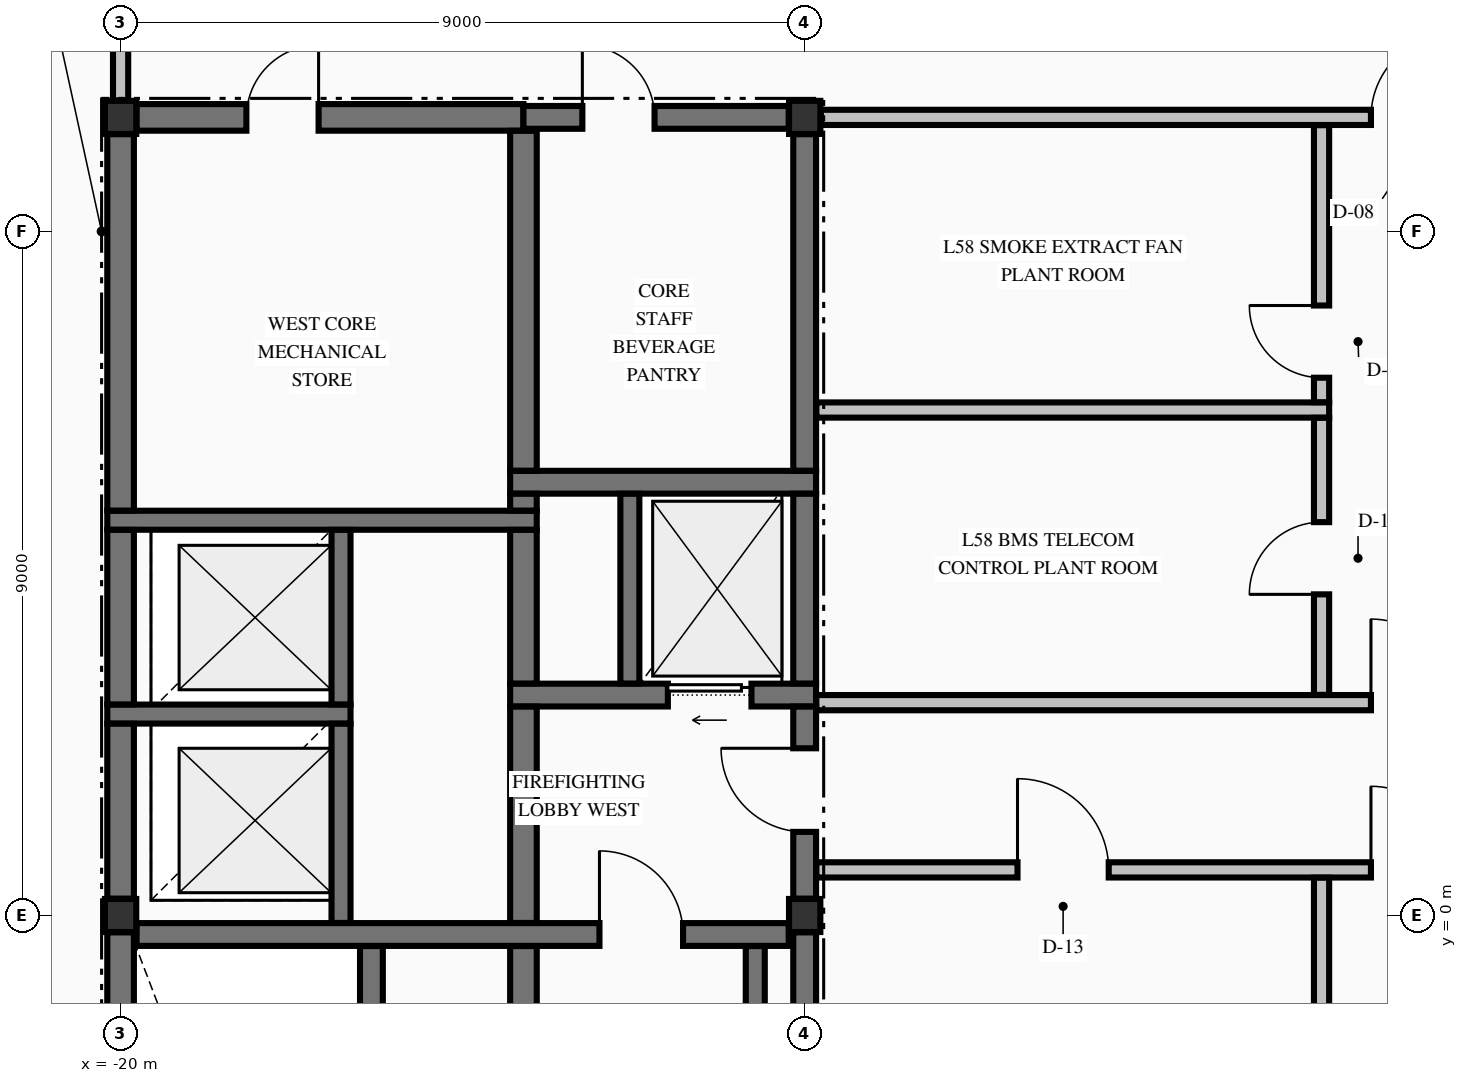
"""IFC4 building model, lengths in metres.
Left out: names, types, materials, properties, quantities, classifications, styles, units other than length and angle.
Written with IfcOpenShell. Run it as: python <this file> out.ifc"""

import sys

from ifc_helpers import new_model, si_unit, direction, frame, frame_2d, origin, origin_2d, place, context, subcontext, project, spatial, rectangle, i_section, extrude, element, fill, save


model = new_model("IFC4")
c1 = context("Model", 3, precision=1e-05, world=origin(), true_north=direction((0.0, 1.0)))
c2 = subcontext(c1, "Body", "Model", "MODEL_VIEW")
j1 = project(units=[si_unit("LENGTHUNIT", "METRE"), si_unit("PLANEANGLEUNIT", "RADIAN")], contexts=[c1])
p1 = place(None, origin())
s1 = spatial("IfcSite", under=j1, at=p1, CompositionType="ELEMENT")
p2 = place(p1, origin())
s2 = spatial("IfcBuilding", under=s1, at=p2, CompositionType="ELEMENT")
p3 = place(p2, frame((0.0, 0.0, 222.06)))
s3 = spatial("IfcBuildingStorey", under=s2, at=p3, CompositionType="ELEMENT", Elevation=222.06)
for number, where, z_axis, x_axis in (
    (1, (-20.0, 10.5, -0.425), (0.0, 0.0, 1.0), (1.0, 0.0, 0.0)),
    (2, (-11.0, 0.0, -0.425), (0.0, 0.0, 1.0), (1.0, 0.0, 0.0)),
    (3, (-11.0, 10.5, -0.425), (0.0, 0.0, 1.0), (1.0, 0.0, 0.0)),
    (4, (-20.0, 0.0, -0.425), (0.0, 0.0, 1.0), (1.0, 0.0, 0.0)),
):
    element("IfcColumn", number, at=place(p3, frame(where, z_axis=z_axis, x_axis=x_axis)), inside=s3, PredefinedType="COLUMN", context=c2, shape_type="SweptSolid", body=[
        extrude(i_section(OverallWidth=0.412, OverallDepth=0.435, WebThickness=0.036, FlangeThickness=0.058, FilletRadius=0.015, at=origin_2d()), origin(), (0.0, 0.0, 1.0), 4.76),
    ])
p4 = place(p3, frame((-19.79, -0.25, 0.0), z_axis=(0.0, 0.0, 1.0), x_axis=(1.0, 0.0, 0.0)))
e5 = element("IfcWall", 5, at=p4, inside=s3, PredefinedType="SHEAR", context=c2, shape_type="SweptSolid", body=[
    extrude(rectangle(XDim=8.58, YDim=0.3, at=frame_2d((4.29, 0.0))), origin(), (0.0, 0.0, 1.0), 4.335),
])
p5 = place(p4, frame((6.09, 0.0, 0.0)))
e6 = element("IfcOpeningElement", 6, at=p5, cuts=e5, PredefinedType="OPENING", context=c2, shape_type="SweptSolid", body=[
    extrude(rectangle(XDim=1.1, YDim=2.15, at=frame_2d((0.55, 1.075))), frame((0.0, 0.16, 0.0), z_axis=(0.0, -1.0, 0.0), x_axis=(1.0, 0.0, 0.0)), (0.0, 0.0, 1.0), 0.32),
])
p6 = place(p3, frame((-20.175, 2.65, 0.0), z_axis=(0.0, 0.0, 1.0), x_axis=(1.0, 0.0, 0.0)))
e7 = element("IfcWall", 7, at=p6, inside=s3, PredefinedType="SOLIDWALL", context=c2, shape_type="SweptSolid", body=[
    extrude(rectangle(XDim=3.2, YDim=0.25, at=frame_2d((1.6, 0.0))), origin(), (0.0, 0.0, 1.0), 4.335),
])
p7 = place(p3, frame((-14.875, 2.9, 0.0), z_axis=(0.0, 0.0, 1.0), x_axis=(1.0, 0.0, 0.0)))
e8 = element("IfcWall", 8, at=p7, inside=s3, PredefinedType="SHEAR", context=c2, shape_type="SweptSolid", body=[
    extrude(rectangle(XDim=4.025, YDim=0.3, at=frame_2d((2.012, 0.0))), origin(), (0.0, 0.0, 1.0), 4.335),
])
p8 = place(p7, frame((2.075, 0.0, 0.0)))
e9 = element("IfcOpeningElement", 9, at=p8, cuts=e8, PredefinedType="OPENING", context=c2, shape_type="SweptSolid", body=[
    extrude(rectangle(XDim=1.1, YDim=2.2, at=frame_2d((0.55, 1.1))), frame((0.0, 0.16, 0.0), z_axis=(0.0, -1.0, 0.0), x_axis=(1.0, 0.0, 0.0)), (0.0, 0.0, 1.0), 0.32),
])
p9 = place(p3, frame((-20.175, 5.2, 0.0), z_axis=(0.0, 0.0, 1.0), x_axis=(1.0, 0.0, 0.0)))
e10 = element("IfcWall", 10, at=p9, inside=s3, PredefinedType="SOLIDWALL", context=c2, shape_type="SweptSolid", body=[
    extrude(rectangle(XDim=5.65, YDim=0.25, at=frame_2d((2.825, 0.0))), origin(), (0.0, 0.0, 1.0), 4.335),
])
p10 = place(p3, frame((-14.875, 5.7, 0.0), z_axis=(0.0, 0.0, 1.0), x_axis=(1.0, 0.0, 0.0)))
e11 = element("IfcWall", 11, at=p10, inside=s3, PredefinedType="SHEAR", context=c2, shape_type="SweptSolid", body=[
    extrude(rectangle(XDim=4.025, YDim=0.3, at=frame_2d((2.012, 0.0))), origin(), (0.0, 0.0, 1.0), 4.335),
])
p11 = place(p3, frame((-19.79, 10.5, 0.0), z_axis=(0.0, 0.0, 1.0), x_axis=(1.0, 0.0, 0.0)))
e12 = element("IfcWall", 12, at=p11, inside=s3, PredefinedType="SHEAR", context=c2, shape_type="SweptSolid", body=[
    extrude(rectangle(XDim=5.09, YDim=0.35, at=frame_2d((2.545, 0.0))), origin(), (0.0, 0.0, 1.0), 4.335),
])
p12 = place(p11, frame((1.445, 0.0, 0.0)))
e13 = element("IfcOpeningElement", 13, at=p12, cuts=e12, PredefinedType="OPENING", context=c2, shape_type="SweptSolid", body=[
    extrude(rectangle(XDim=0.95, YDim=2.02, at=frame_2d((0.475, 1.01))), frame((0.0, 0.185, 0.0), z_axis=(0.0, -1.0, 0.0), x_axis=(1.0, 0.0, 0.0)), (0.0, 0.0, 1.0), 0.37),
])
p13 = place(p3, frame((-14.7, 10.5, 0.0), z_axis=(0.0, 0.0, 1.0), x_axis=(1.0, 0.0, 0.0)))
e14 = element("IfcWall", 14, at=p13, inside=s3, PredefinedType="SHEAR", context=c2, shape_type="SweptSolid", body=[
    extrude(rectangle(XDim=3.49, YDim=0.3, at=frame_2d((1.745, 0.0))), origin(), (0.0, 0.0, 1.0), 4.335),
])
p14 = place(p13, frame((0.775, 0.0, 0.0)))
e15 = element("IfcOpeningElement", 15, at=p14, cuts=e14, PredefinedType="OPENING", context=c2, shape_type="SweptSolid", body=[
    extrude(rectangle(XDim=0.95, YDim=2.02, at=frame_2d((0.475, 1.01))), frame((0.0, 0.16, 0.0), z_axis=(0.0, -1.0, 0.0), x_axis=(1.0, 0.0, 0.0)), (0.0, 0.0, 1.0), 0.32),
])
p15 = place(p3, frame((-10.847, 0.6, 0.0), z_axis=(0.0, 0.0, 1.0), x_axis=(1.0, 0.0, 0.0)))
e16 = element("IfcWall", 16, at=p15, inside=s3, PredefinedType="PARTITIONING", context=c2, shape_type="SweptSolid", body=[
    extrude(rectangle(XDim=21.694, YDim=0.2, at=frame_2d((10.847, 0.0))), origin(), (0.0, 0.0, 1.0), 4.335),
])
p16 = place(p15, frame((7.297, 0.0, 0.0)))
e17 = element("IfcOpeningElement", 17, at=p16, cuts=e16, PredefinedType="OPENING", context=c2, shape_type="SweptSolid", body=[
    extrude(rectangle(XDim=1.1, YDim=2.15, at=frame_2d((0.55, 1.075))), frame((0.0, 0.11, 0.0), z_axis=(0.0, -1.0, 0.0), x_axis=(1.0, 0.0, 0.0)), (0.0, 0.0, 1.0), 0.22),
])
p17 = place(p15, frame((2.647, 0.0, 0.0)))
e18 = element("IfcOpeningElement", 18, at=p17, cuts=e16, PredefinedType="OPENING", context=c2, shape_type="SweptSolid", body=[
    extrude(rectangle(XDim=1.2, YDim=2.15, at=frame_2d((0.6, 1.075))), frame((0.0, 0.11, 0.0), z_axis=(0.0, -1.0, 0.0), x_axis=(1.0, 0.0, 0.0)), (0.0, 0.0, 1.0), 0.22),
])
p18 = place(p15, frame((14.847, 0.0, 0.0)))
e19 = element("IfcOpeningElement", 19, at=p18, cuts=e16, PredefinedType="OPENING", context=c2, shape_type="SweptSolid", body=[
    extrude(rectangle(XDim=1.2, YDim=2.15, at=frame_2d((0.6, 1.075))), frame((0.0, 0.11, 0.0), z_axis=(0.0, -1.0, 0.0), x_axis=(1.0, 0.0, 0.0)), (0.0, 0.0, 1.0), 0.22),
])
p19 = place(p3, frame((-10.847, 2.8, 0.0), z_axis=(0.0, 0.0, 1.0), x_axis=(1.0, 0.0, 0.0)))
e20 = element("IfcWall", 20, at=p19, inside=s3, PredefinedType="PARTITIONING", context=c2, shape_type="SweptSolid", body=[
    extrude(rectangle(XDim=21.694, YDim=0.2, at=frame_2d((10.847, 0.0))), origin(), (0.0, 0.0, 1.0), 4.335),
])
p20 = place(p19, frame((7.297, 0.0, 0.0)))
e21 = element("IfcOpeningElement", 21, at=p20, cuts=e20, PredefinedType="OPENING", context=c2, shape_type="SweptSolid", body=[
    extrude(rectangle(XDim=1.1, YDim=2.15, at=frame_2d((0.55, 1.075))), frame((0.0, 0.11, 0.0), z_axis=(0.0, -1.0, 0.0), x_axis=(1.0, 0.0, 0.0)), (0.0, 0.0, 1.0), 0.22),
])
p21 = place(p19, frame((17.497, 0.0, 0.0)))
e22 = element("IfcOpeningElement", 22, at=p21, cuts=e20, PredefinedType="OPENING", context=c2, shape_type="SweptSolid", body=[
    extrude(rectangle(XDim=1.1, YDim=2.15, at=frame_2d((0.55, 1.075))), frame((0.0, 0.11, 0.0), z_axis=(0.0, -1.0, 0.0), x_axis=(1.0, 0.0, 0.0)), (0.0, 0.0, 1.0), 0.22),
])
p22 = place(p3, frame((-10.847, 6.65, 0.0), z_axis=(0.0, 0.0, 1.0), x_axis=(1.0, 0.0, 0.0)))
e23 = element("IfcWall", 23, at=p22, inside=s3, PredefinedType="PARTITIONING", context=c2, shape_type="SweptSolid", body=[
    extrude(rectangle(XDim=6.747, YDim=0.2, at=frame_2d((3.374, 0.0))), origin(), (0.0, 0.0, 1.0), 4.335),
])
p23 = place(p3, frame((-10.788, 10.5, 0.0), z_axis=(0.0, 0.0, 1.0), x_axis=(1.0, 0.0, 0.0)))
e24 = element("IfcWall", 24, at=p23, inside=s3, PredefinedType="PARTITIONING", context=c2, shape_type="SweptSolid", body=[
    extrude(rectangle(XDim=21.576, YDim=0.2, at=frame_2d((10.788, 0.0))), origin(), (0.0, 0.0, 1.0), 4.335),
])
p24 = place(p23, frame((7.238, 0.0, 0.0)))
e25 = element("IfcOpeningElement", 25, at=p24, cuts=e24, PredefinedType="OPENING", context=c2, shape_type="SweptSolid", body=[
    extrude(rectangle(XDim=1.1, YDim=2.15, at=frame_2d((0.55, 1.075))), frame((0.0, 0.11, 0.0), z_axis=(0.0, -1.0, 0.0), x_axis=(1.0, 0.0, 0.0)), (0.0, 0.0, 1.0), 0.22),
])
p25 = place(p3, frame((-20.0, -9.729, 0.0), z_axis=(0.0, 0.0, 1.0), x_axis=(0.0, 1.0, 0.0)))
e26 = element("IfcWall", 26, at=p25, inside=s3, PredefinedType="SHEAR", context=c2, shape_type="SweptSolid", body=[
    extrude(rectangle(XDim=9.507, YDim=0.35, at=frame_2d((4.753, 0.0))), origin(), (0.0, 0.0, 1.0), 4.335),
])
p26 = place(p3, frame((-20.0, 0.221, 0.0), z_axis=(0.0, 0.0, 1.0), x_axis=(0.0, 1.0, 0.0)))
e27 = element("IfcWall", 27, at=p26, inside=s3, PredefinedType="SHEAR", context=c2, shape_type="SweptSolid", body=[
    extrude(rectangle(XDim=2.302, YDim=0.35, at=frame_2d((1.151, 0.0))), origin(), (0.0, 0.0, 1.0), 4.335),
])
p27 = place(p3, frame((-20.0, 2.777, 0.0), z_axis=(0.0, 0.0, 1.0), x_axis=(0.0, 1.0, 0.0)))
e28 = element("IfcWall", 28, at=p27, inside=s3, PredefinedType="SHEAR", context=c2, shape_type="SweptSolid", body=[
    extrude(rectangle(XDim=2.296, YDim=0.35, at=frame_2d((1.148, 0.0))), origin(), (0.0, 0.0, 1.0), 4.335),
])
p28 = place(p3, frame((-20.0, 5.327, 0.0), z_axis=(0.0, 0.0, 1.0), x_axis=(0.0, 1.0, 0.0)))
e29 = element("IfcWall", 29, at=p28, inside=s3, PredefinedType="SHEAR", context=c2, shape_type="SweptSolid", body=[
    extrude(rectangle(XDim=4.952, YDim=0.35, at=frame_2d((2.476, 0.0))), origin(), (0.0, 0.0, 1.0), 4.335),
])
p29 = place(p3, frame((-17.1, -0.098, 0.0), z_axis=(0.0, 0.0, 1.0), x_axis=(0.0, 1.0, 0.0)))
e30 = element("IfcWall", 30, at=p29, inside=s3, PredefinedType="SOLIDWALL", context=c2, shape_type="SweptSolid", body=[
    extrude(rectangle(XDim=2.621, YDim=0.25, at=frame_2d((1.311, 0.0))), origin(), (0.0, 0.0, 1.0), 4.335),
])
p30 = place(p3, frame((-17.1, 2.777, 0.0), z_axis=(0.0, 0.0, 1.0), x_axis=(0.0, 1.0, 0.0)))
e31 = element("IfcWall", 31, at=p30, inside=s3, PredefinedType="SOLIDWALL", context=c2, shape_type="SweptSolid", body=[
    extrude(rectangle(XDim=2.296, YDim=0.25, at=frame_2d((1.148, 0.0))), origin(), (0.0, 0.0, 1.0), 4.335),
])
p31 = place(p3, frame((-16.7, -9.773, 0.0), z_axis=(0.0, 0.0, 1.0), x_axis=(0.0, 1.0, 0.0)))
e32 = element("IfcWall", 32, at=p31, inside=s3, PredefinedType="SHEAR", context=c2, shape_type="SweptSolid", body=[
    extrude(rectangle(XDim=9.371, YDim=0.3, at=frame_2d((4.686, 0.0))), origin(), (0.0, 0.0, 1.0), 4.335),
])
p32 = place(p3, frame((-14.7, -9.773, 0.0), z_axis=(0.0, 0.0, 1.0), x_axis=(0.0, 1.0, 0.0)))
e33 = element("IfcWall", 33, at=p32, inside=s3, PredefinedType="SHEAR", context=c2, shape_type="SweptSolid", body=[
    extrude(rectangle(XDim=9.371, YDim=0.35, at=frame_2d((4.686, 0.0))), origin(), (0.0, 0.0, 1.0), 4.335),
])
p33 = place(p3, frame((-14.7, -0.098, 0.0), z_axis=(0.0, 0.0, 1.0), x_axis=(0.0, 1.0, 0.0)))
e34 = element("IfcWall", 34, at=p33, inside=s3, PredefinedType="SHEAR", context=c2, shape_type="SweptSolid", body=[
    extrude(rectangle(XDim=2.846, YDim=0.35, at=frame_2d((1.423, 0.0))), origin(), (0.0, 0.0, 1.0), 4.335),
])
p34 = place(p3, frame((-14.7, 3.052, 0.0), z_axis=(0.0, 0.0, 1.0), x_axis=(0.0, 1.0, 0.0)))
e35 = element("IfcWall", 35, at=p34, inside=s3, PredefinedType="SHEAR", context=c2, shape_type="SweptSolid", body=[
    extrude(rectangle(XDim=2.021, YDim=0.35, at=frame_2d((1.01, 0.0))), origin(), (0.0, 0.0, 1.0), 4.335),
])
p35 = place(p3, frame((-14.7, 5.327, 0.0), z_axis=(0.0, 0.0, 1.0), x_axis=(0.0, 1.0, 0.0)))
e36 = element("IfcWall", 36, at=p35, inside=s3, PredefinedType="SHEAR", context=c2, shape_type="SweptSolid", body=[
    extrude(rectangle(XDim=0.221, YDim=0.35, at=frame_2d((0.111, 0.0))), origin(), (0.0, 0.0, 1.0), 4.335),
])
p36 = place(p3, frame((-14.7, 5.852, 0.0), z_axis=(0.0, 0.0, 1.0), x_axis=(0.0, 1.0, 0.0)))
e37 = element("IfcWall", 37, at=p36, inside=s3, PredefinedType="SHEAR", context=c2, shape_type="SweptSolid", body=[
    extrude(rectangle(XDim=4.471, YDim=0.35, at=frame_2d((2.235, 0.0))), origin(), (0.0, 0.0, 1.0), 4.335),
])
p37 = place(p3, frame((-13.3, 3.052, 0.0), z_axis=(0.0, 0.0, 1.0), x_axis=(0.0, 1.0, 0.0)))
e38 = element("IfcWall", 38, at=p37, inside=s3, PredefinedType="SOLIDWALL", context=c2, shape_type="SweptSolid", body=[
    extrude(rectangle(XDim=2.496, YDim=0.25, at=frame_2d((1.248, 0.0))), origin(), (0.0, 0.0, 1.0), 4.335),
])
p38 = place(p3, frame((-11.65, -9.798, 0.0), z_axis=(0.0, 0.0, 1.0), x_axis=(0.0, 1.0, 0.0)))
e39 = element("IfcWall", 39, at=p38, inside=s3, PredefinedType="SOLIDWALL", context=c2, shape_type="SweptSolid", body=[
    extrude(rectangle(XDim=9.396, YDim=0.25, at=frame_2d((4.698, 0.0))), origin(), (0.0, 0.0, 1.0), 4.335),
])
p39 = place(p3, frame((-11.0, -9.729, 0.0), z_axis=(0.0, 0.0, 1.0), x_axis=(0.0, 1.0, 0.0)))
e40 = element("IfcWall", 40, at=p39, inside=s3, PredefinedType="SHEAR", context=c2, shape_type="SweptSolid", body=[
    extrude(rectangle(XDim=9.507, YDim=0.3, at=frame_2d((4.753, 0.0))), origin(), (0.0, 0.0, 1.0), 4.335),
])
p40 = place(p3, frame((-11.0, 0.221, 0.0), z_axis=(0.0, 0.0, 1.0), x_axis=(0.0, 1.0, 0.0)))
e41 = element("IfcWall", 41, at=p40, inside=s3, PredefinedType="SHEAR", context=c2, shape_type="SweptSolid", body=[
    extrude(rectangle(XDim=2.527, YDim=0.3, at=frame_2d((1.263, 0.0))), origin(), (0.0, 0.0, 1.0), 4.335),
])
p41 = place(p40, frame((0.878, 0.0, 0.0)))
e42 = element("IfcOpeningElement", 42, at=p41, cuts=e41, PredefinedType="OPENING", context=c2, shape_type="SweptSolid", body=[
    extrude(rectangle(XDim=1.1, YDim=2.15, at=frame_2d((0.55, 1.075))), frame((0.0, 0.16, 0.0), z_axis=(0.0, -1.0, 0.0), x_axis=(1.0, 0.0, 0.0)), (0.0, 0.0, 1.0), 0.32),
])
p42 = place(p3, frame((-11.0, 3.052, 0.0), z_axis=(0.0, 0.0, 1.0), x_axis=(0.0, 1.0, 0.0)))
e43 = element("IfcWall", 43, at=p42, inside=s3, PredefinedType="SHEAR", context=c2, shape_type="SweptSolid", body=[
    extrude(rectangle(XDim=2.496, YDim=0.3, at=frame_2d((1.248, 0.0))), origin(), (0.0, 0.0, 1.0), 4.335),
])
p43 = place(p3, frame((-11.0, 5.852, 0.0), z_axis=(0.0, 0.0, 1.0), x_axis=(0.0, 1.0, 0.0)))
e44 = element("IfcWall", 44, at=p43, inside=s3, PredefinedType="SHEAR", context=c2, shape_type="SweptSolid", body=[
    extrude(rectangle(XDim=4.427, YDim=0.3, at=frame_2d((2.213, 0.0))), origin(), (0.0, 0.0, 1.0), 4.335),
])
p44 = place(p3, frame((-20.0, 10.723, 0.0), z_axis=(0.0, 0.0, 1.0), x_axis=(0.0, 1.0, 0.0)))
e45 = element("IfcWall", 45, at=p44, inside=s3, PredefinedType="PARTITIONING", context=c2, shape_type="SweptSolid", body=[
    extrude(rectangle(XDim=1.974, YDim=0.2, at=frame_2d((0.987, 0.0))), origin(), (0.0, 0.0, 1.0), 2.127),
])
p45 = place(p3, frame((-4.2, -9.847, 0.0), z_axis=(0.0, 0.0, 1.0), x_axis=(0.0, 1.0, 0.0)))
e46 = element("IfcWall", 46, at=p45, inside=s3, PredefinedType="PARTITIONING", context=c2, shape_type="SweptSolid", body=[
    extrude(rectangle(XDim=10.344, YDim=0.2, at=frame_2d((5.172, 0.0))), origin(), (0.0, 0.0, 1.0), 4.335),
])
p46 = place(p3, frame((-4.2, 2.903, 0.0), z_axis=(0.0, 0.0, 1.0), x_axis=(0.0, 1.0, 0.0)))
e47 = element("IfcWall", 47, at=p46, inside=s3, PredefinedType="PARTITIONING", context=c2, shape_type="SweptSolid", body=[
    extrude(rectangle(XDim=3.644, YDim=0.2, at=frame_2d((1.822, 0.0))), origin(), (0.0, 0.0, 1.0), 4.335),
])
p47 = place(p46, frame((1.322, 0.0, 0.0)))
e48 = element("IfcOpeningElement", 48, at=p47, cuts=e47, PredefinedType="OPENING", context=c2, shape_type="SweptSolid", body=[
    extrude(rectangle(XDim=0.95, YDim=2.15, at=frame_2d((0.475, 1.075))), frame((0.0, 0.11, 0.0), z_axis=(0.0, -1.0, 0.0), x_axis=(1.0, 0.0, 0.0)), (0.0, 0.0, 1.0), 0.22),
])
p48 = place(p3, frame((-4.2, 6.753, 0.0), z_axis=(0.0, 0.0, 1.0), x_axis=(0.0, 1.0, 0.0)))
e49 = element("IfcWall", 49, at=p48, inside=s3, PredefinedType="PARTITIONING", context=c2, shape_type="SweptSolid", body=[
    extrude(rectangle(XDim=3.644, YDim=0.2, at=frame_2d((1.822, 0.0))), origin(), (0.0, 0.0, 1.0), 4.335),
])
p49 = place(p48, frame((0.322, 0.0, 0.0)))
e50 = element("IfcOpeningElement", 50, at=p49, cuts=e49, PredefinedType="OPENING", context=c2, shape_type="SweptSolid", body=[
    extrude(rectangle(XDim=0.95, YDim=2.15, at=frame_2d((0.475, 1.075))), frame((0.0, 0.11, 0.0), z_axis=(0.0, -1.0, 0.0), x_axis=(1.0, 0.0, 0.0)), (0.0, 0.0, 1.0), 0.22),
])
p50 = place(p5, origin())
e51 = element("IfcDoor", 51, at=p50, inside=s3, OperationType="SINGLE_SWING_LEFT", PredefinedType="DOOR", context=c2, shape_type="SweptSolid", body=[
    extrude(rectangle(XDim=1.1, YDim=2.15, at=frame_2d((0.55, 1.075))), frame((0.0, 0.025, 0.0), z_axis=(0.0, -1.0, 0.0), x_axis=(1.0, 0.0, 0.0)), (0.0, 0.0, 1.0), 0.05),
])
fill(e6, e51)
p51 = place(p41, origin())
e52 = element("IfcDoor", 52, at=p51, inside=s3, OperationType="SINGLE_SWING_RIGHT", PredefinedType="DOOR", context=c2, shape_type="SweptSolid", body=[
    extrude(rectangle(XDim=1.1, YDim=2.15, at=frame_2d((0.55, 1.075))), frame((0.0, 0.025, 0.0), z_axis=(0.0, -1.0, 0.0), x_axis=(1.0, 0.0, 0.0)), (0.0, 0.0, 1.0), 0.05),
])
fill(e42, e52)
p52 = place(p8, origin())
e53 = element("IfcDoor", 53, at=p52, inside=s3, OperationType="SLIDING_TO_LEFT", PredefinedType="DOOR", context=c2, shape_type="SweptSolid", body=[
    extrude(rectangle(XDim=1.1, YDim=2.2, at=frame_2d((0.55, 1.1))), frame((0.0, 0.025, 0.0), z_axis=(0.0, -1.0, 0.0), x_axis=(1.0, 0.0, 0.0)), (0.0, 0.0, 1.0), 0.05),
])
fill(e9, e53)
p53 = place(p14, origin())
e54 = element("IfcDoor", 54, at=p53, inside=s3, OperationType="SINGLE_SWING_LEFT", PredefinedType="DOOR", context=c2, shape_type="SweptSolid", body=[
    extrude(rectangle(XDim=0.95, YDim=2.02, at=frame_2d((0.475, 1.01))), frame((0.0, 0.025, 0.0), z_axis=(0.0, -1.0, 0.0), x_axis=(1.0, 0.0, 0.0)), (0.0, 0.0, 1.0), 0.05),
])
fill(e15, e54)
p54 = place(p12, origin())
e55 = element("IfcDoor", 55, at=p54, inside=s3, OperationType="SINGLE_SWING_RIGHT", PredefinedType="DOOR", context=c2, shape_type="SweptSolid", body=[
    extrude(rectangle(XDim=0.95, YDim=2.02, at=frame_2d((0.475, 1.01))), frame((0.0, 0.025, 0.0), z_axis=(0.0, -1.0, 0.0), x_axis=(1.0, 0.0, 0.0)), (0.0, 0.0, 1.0), 0.05),
])
fill(e13, e55)
p55 = place(p20, origin())
e56 = element("IfcDoor", 56, at=p55, inside=s3, OperationType="SINGLE_SWING_LEFT", PredefinedType="DOOR", context=c2, shape_type="SweptSolid", body=[
    extrude(rectangle(XDim=1.1, YDim=2.15, at=frame_2d((0.55, 1.075))), frame((0.0, 0.025, 0.0), z_axis=(0.0, -1.0, 0.0), x_axis=(1.0, 0.0, 0.0)), (0.0, 0.0, 1.0), 0.05),
])
fill(e21, e56)
p56 = place(p24, origin())
e57 = element("IfcDoor", 57, at=p56, inside=s3, OperationType="SINGLE_SWING_RIGHT", PredefinedType="DOOR", context=c2, shape_type="SweptSolid", body=[
    extrude(rectangle(XDim=1.1, YDim=2.15, at=frame_2d((0.55, 1.075))), frame((0.0, 0.025, 0.0), z_axis=(0.0, -1.0, 0.0), x_axis=(1.0, 0.0, 0.0)), (0.0, 0.0, 1.0), 0.05),
])
fill(e25, e57)
p57 = place(p16, origin())
e58 = element("IfcDoor", 58, at=p57, inside=s3, OperationType="SINGLE_SWING_LEFT", PredefinedType="DOOR", context=c2, shape_type="SweptSolid", body=[
    extrude(rectangle(XDim=1.1, YDim=2.15, at=frame_2d((0.55, 1.075))), frame((0.0, 0.025, 0.0), z_axis=(0.0, -1.0, 0.0), x_axis=(1.0, 0.0, 0.0)), (0.0, 0.0, 1.0), 0.05),
])
fill(e17, e58)
p58 = place(p17, origin())
e59 = element("IfcDoor", 59, at=p58, inside=s3, OperationType="SINGLE_SWING_LEFT", PredefinedType="DOOR", context=c2, shape_type="SweptSolid", body=[
    extrude(rectangle(XDim=1.2, YDim=2.15, at=frame_2d((0.6, 1.075))), frame((0.0, 0.025, 0.0), z_axis=(0.0, -1.0, 0.0), x_axis=(1.0, 0.0, 0.0)), (0.0, 0.0, 1.0), 0.05),
])
fill(e18, e59)
p59 = place(p47, origin())
e60 = element("IfcDoor", 60, at=p59, inside=s3, OperationType="SINGLE_SWING_LEFT", PredefinedType="DOOR", context=c2, shape_type="SweptSolid", body=[
    extrude(rectangle(XDim=0.95, YDim=2.15, at=frame_2d((0.475, 1.075))), frame((0.0, 0.025, 0.0), z_axis=(0.0, -1.0, 0.0), x_axis=(1.0, 0.0, 0.0)), (0.0, 0.0, 1.0), 0.05),
])
fill(e48, e60)
p60 = place(p49, origin())
e61 = element("IfcDoor", 61, at=p60, inside=s3, OperationType="SINGLE_SWING_RIGHT", PredefinedType="DOOR", context=c2, shape_type="SweptSolid", body=[
    extrude(rectangle(XDim=0.95, YDim=2.15, at=frame_2d((0.475, 1.075))), frame((0.0, 0.025, 0.0), z_axis=(0.0, -1.0, 0.0), x_axis=(1.0, 0.0, 0.0)), (0.0, 0.0, 1.0), 0.05),
])
fill(e50, e61)
save(model, sys.argv[1])
